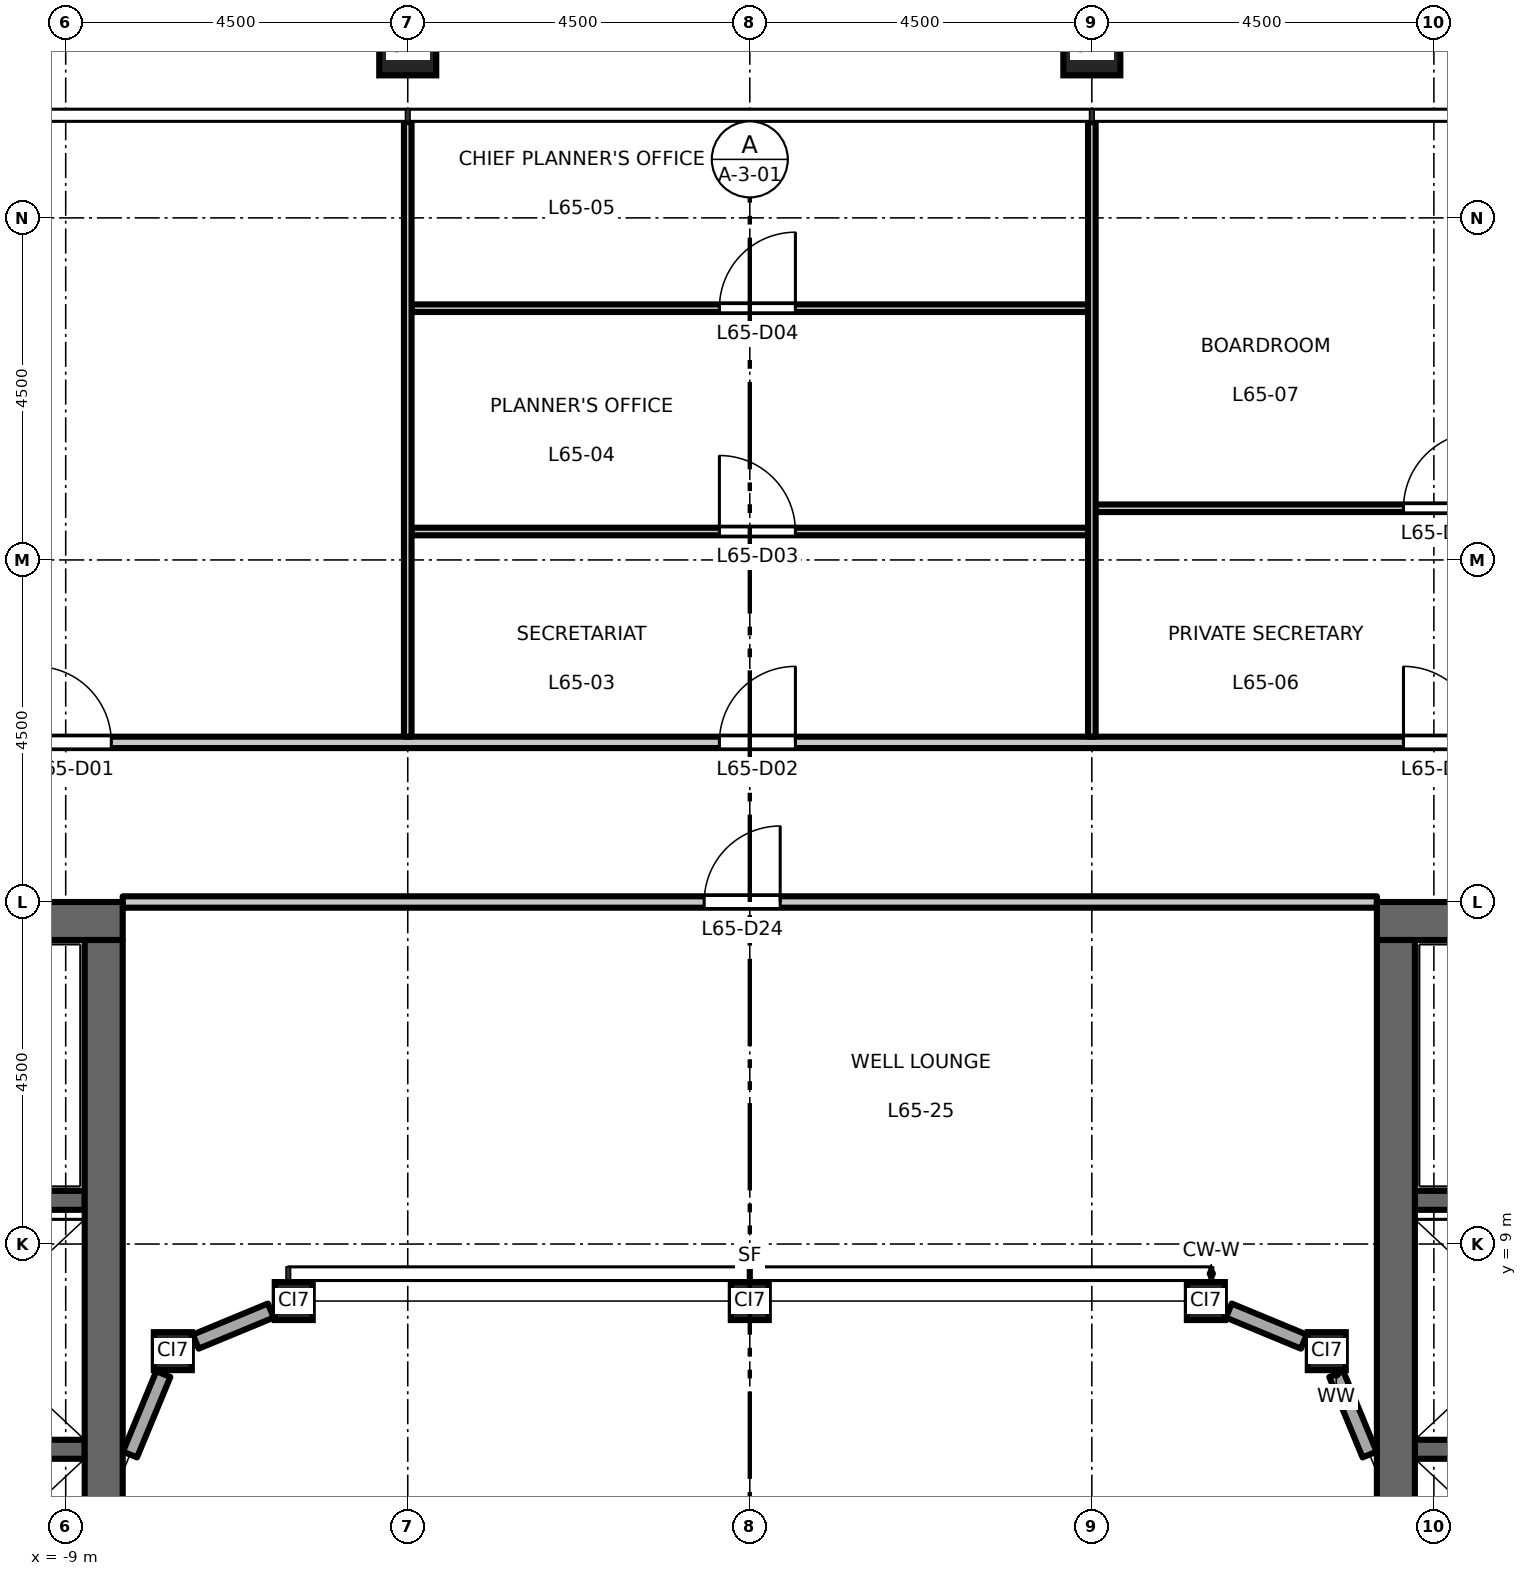
"""IFC4 building model, lengths in metres.
Left out: names, types, materials, properties, quantities, classifications, styles, units other than length and angle.
Written with IfcOpenShell. Run it as: python <this file> out.ifc"""

import sys

from ifc_helpers import new_model, si_unit, direction, frame, frame_2d, origin, origin_2d, place, context, subcontext, project, spatial, rectangle, hollow_rectangle, extrude, element, fill, save


model = new_model("IFC4")
c1 = context("Model", 3, precision=1e-05, world=origin(), true_north=direction((0.0, 1.0)))
c2 = subcontext(c1, "Body", "Model", "MODEL_VIEW")
j1 = project(units=[si_unit("LENGTHUNIT", "METRE"), si_unit("PLANEANGLEUNIT", "RADIAN")], contexts=[c1])
p1 = place(None, origin())
s1 = spatial("IfcSite", under=j1, at=p1, CompositionType="ELEMENT")
p2 = place(p1, origin())
s2 = spatial("IfcBuilding", under=s1, at=p2, CompositionType="ELEMENT")
p3 = place(p2, frame((0.0, 0.0, 303.2)))
s3 = spatial("IfcBuildingStorey", under=s2, at=p3, CompositionType="ELEMENT", Elevation=303.2)
for number, where, z_axis, x_axis in (
    (1, (4.5, 24.75, 0.0), (0.0, 0.0, 1.0), (1.0, 0.0, 0.0)),
    (2, (-4.5, 24.75, 0.0), (0.0, 0.0, 1.0), (1.0, 0.0, 0.0)),
):
    element("IfcColumn", number, at=place(p3, frame(where, z_axis=z_axis, x_axis=x_axis)), inside=s3, PredefinedType="COLUMN", context=c2, shape_type="SweptSolid", body=[
        extrude(hollow_rectangle(XDim=0.75, YDim=0.75, WallThickness=0.04, at=origin_2d()), origin(), (0.0, 0.0, 1.0), 4.5),
    ])
for number, where, z_axis, x_axis in (
    (3, (-7.591, 7.591, 0.0), (0.0, 0.0, 1.0), (1.0, 0.0, 0.0)),
    (4, (-6.0, 8.25, 0.0), (0.0, 0.0, 1.0), (1.0, 0.0, 0.0)),
    (5, (0.0, 8.25, 0.0), (0.0, 0.0, 1.0), (1.0, 0.0, 0.0)),
    (6, (6.0, 8.25, 0.0), (0.0, 0.0, 1.0), (1.0, 0.0, 0.0)),
    (7, (7.591, 7.591, 0.0), (0.0, 0.0, 1.0), (1.0, 0.0, 0.0)),
):
    element("IfcColumn", number, at=place(p3, frame(where, z_axis=z_axis, x_axis=x_axis)), inside=s3, PredefinedType="COLUMN", context=c2, shape_type="SweptSolid", body=[
        extrude(hollow_rectangle(XDim=0.5, YDim=0.5, WallThickness=0.025, at=origin_2d()), origin(), (0.0, 0.0, 1.0), 4.5),
    ])
p4 = place(p3, frame((-8.75, 6.3, 0.0), z_axis=(0.0, 0.0, 1.0), x_axis=(-1.0, 0.0, 0.0)))
e8 = element("IfcWall", 8, at=p4, inside=s3, PredefinedType="SHEAR", context=c2, shape_type="SweptSolid", body=[
    extrude(rectangle(XDim=3.1, YDim=0.25, at=frame_2d((1.55, 0.0))), origin(), (0.0, 0.0, 1.0), 4.35),
])
p5 = place(p3, frame((-8.75, 9.575, 0.0), z_axis=(0.0, 0.0, 1.0), x_axis=(-1.0, 0.0, 0.0)))
e9 = element("IfcWall", 9, at=p5, inside=s3, PredefinedType="SHEAR", context=c2, shape_type="SweptSolid", body=[
    extrude(rectangle(XDim=8.0, YDim=0.25, at=frame_2d((4.0, 0.0))), origin(), (0.0, 0.0, 1.0), 4.35),
])
p6 = place(p5, frame((6.65, 0.0, 0.0)))
e10 = element("IfcOpeningElement", 10, at=p6, cuts=e9, PredefinedType="OPENING", context=c2, shape_type="SweptSolid", body=[
    extrude(rectangle(XDim=1.1, YDim=2.1, at=frame_2d((0.55, 1.05))), frame((0.0, 0.135, 0.0), z_axis=(0.0, -1.0, 0.0), x_axis=(1.0, 0.0, 0.0)), (0.0, 0.0, 1.0), 0.27),
])
p7 = place(p3, frame((-8.25, 13.25, 0.0), z_axis=(0.0, 0.0, 1.0), x_axis=(-1.0, 0.0, 0.0)))
e11 = element("IfcWall", 11, at=p7, inside=s3, PredefinedType="SHEAR", context=c2, shape_type="SweptSolid", body=[
    extrude(rectangle(XDim=9.0, YDim=0.5, at=frame_2d((4.5, 0.0))), origin(), (0.0, 0.0, 1.0), 4.35),
])
p8 = place(p3, frame((-8.5, -13.0, 0.0), z_axis=(0.0, 0.0, 1.0), x_axis=(0.0, 1.0, 0.0)))
e12 = element("IfcWall", 12, at=p8, inside=s3, PredefinedType="SHEAR", context=c2, shape_type="SweptSolid", body=[
    extrude(rectangle(XDim=26.0, YDim=0.5, at=frame_2d((13.0, 0.0))), origin(), (0.0, 0.0, 1.0), 4.35),
])
p9 = place(p3, frame((8.75, 6.3, 0.0), z_axis=(0.0, 0.0, 1.0), x_axis=(1.0, 0.0, 0.0)))
e13 = element("IfcWall", 13, at=p9, inside=s3, PredefinedType="SHEAR", context=c2, shape_type="SweptSolid", body=[
    extrude(rectangle(XDim=3.1, YDim=0.25, at=frame_2d((1.55, 0.0))), origin(), (0.0, 0.0, 1.0), 4.35),
])
p10 = place(p3, frame((8.75, 9.575, 0.0), z_axis=(0.0, 0.0, 1.0), x_axis=(1.0, 0.0, 0.0)))
e14 = element("IfcWall", 14, at=p10, inside=s3, PredefinedType="SHEAR", context=c2, shape_type="SweptSolid", body=[
    extrude(rectangle(XDim=8.0, YDim=0.25, at=frame_2d((4.0, 0.0))), origin(), (0.0, 0.0, 1.0), 4.35),
])
p11 = place(p10, frame((6.65, 0.0, 0.0)))
e15 = element("IfcOpeningElement", 15, at=p11, cuts=e14, PredefinedType="OPENING", context=c2, shape_type="SweptSolid", body=[
    extrude(rectangle(XDim=1.1, YDim=2.1, at=frame_2d((0.55, 1.05))), frame((0.0, 0.135, 0.0), z_axis=(0.0, -1.0, 0.0), x_axis=(1.0, 0.0, 0.0)), (0.0, 0.0, 1.0), 0.27),
])
p12 = place(p3, frame((8.25, 13.25, 0.0), z_axis=(0.0, 0.0, 1.0), x_axis=(1.0, 0.0, 0.0)))
e16 = element("IfcWall", 16, at=p12, inside=s3, PredefinedType="SHEAR", context=c2, shape_type="SweptSolid", body=[
    extrude(rectangle(XDim=9.0, YDim=0.5, at=frame_2d((4.5, 0.0))), origin(), (0.0, 0.0, 1.0), 4.35),
])
p13 = place(p3, frame((8.5, -13.0, 0.0), z_axis=(0.0, 0.0, 1.0), x_axis=(0.0, 1.0, 0.0)))
e17 = element("IfcWall", 17, at=p13, inside=s3, PredefinedType="SHEAR", context=c2, shape_type="SweptSolid", body=[
    extrude(rectangle(XDim=26.0, YDim=0.5, at=frame_2d((13.0, 0.0))), origin(), (0.0, 0.0, 1.0), 4.35),
])
p14 = place(p3, frame((8.154, 6.231, 0.0), z_axis=(0.0, 0.0, 1.0), x_axis=(-0.382571404949, 0.923925927829, 0.0)))
e18 = element("IfcWall", 18, at=p14, inside=s3, PredefinedType="STANDARD", context=c2, shape_type="SweptSolid", body=[
    extrude(rectangle(XDim=1.146, YDim=0.2, at=frame_2d((0.573, 0.0))), origin(), (0.0, 0.0, 1.0), 4.01),
])
for number, where, z_axis, x_axis in (
    (19, (7.289, 7.716, 0.0), (0.0, 0.0, 1.0), (-0.924, 0.383, 0.0)),
    (20, (-6.302, 8.125, 0.0), (0.0, 0.0, 1.0), (-0.924, -0.383, 0.0)),
):
    element("IfcWall", number, at=place(p3, frame(where, z_axis=z_axis, x_axis=x_axis)), inside=s3, PredefinedType="STANDARD", context=c2, shape_type="SweptSolid", body=[
        extrude(rectangle(XDim=1.069, YDim=0.2, at=frame_2d((0.534, 0.0))), origin(), (0.0, 0.0, 1.0), 4.01),
    ])
p15 = place(p3, frame((-7.716, 7.289, 0.0), z_axis=(0.0, 0.0, 1.0), x_axis=(-0.382571404949, -0.923925927829, 0.0)))
e21 = element("IfcWall", 21, at=p15, inside=s3, PredefinedType="STANDARD", context=c2, shape_type="SweptSolid", body=[
    extrude(rectangle(XDim=1.146, YDim=0.2, at=frame_2d((0.573, 0.0))), origin(), (0.0, 0.0, 1.0), 4.01),
])
p16 = place(p3, frame((-8.25, 13.5, 0.0), z_axis=(0.0, 0.0, 1.0), x_axis=(1.0, 0.0, 0.0)))
e22 = element("IfcWall", 22, at=p16, inside=s3, PredefinedType="PARTITIONING", context=c2, shape_type="SweptSolid", body=[
    extrude(rectangle(XDim=16.5, YDim=0.15, at=frame_2d((8.25, 0.0))), origin(), (0.0, 0.0, 1.0), 4.35),
])
p17 = place(p16, frame((7.65, 0.0, 0.0)))
e23 = element("IfcOpeningElement", 23, at=p17, cuts=e22, PredefinedType="OPENING", context=c2, shape_type="SweptSolid", body=[
    extrude(rectangle(XDim=1.0, YDim=2.1, at=frame_2d((0.5, 1.05))), frame((0.0, 0.085, 0.0), z_axis=(0.0, -1.0, 0.0), x_axis=(1.0, 0.0, 0.0)), (0.0, 0.0, 1.0), 0.17),
])
p18 = place(p3, frame((-19.425, 15.6, 0.0), z_axis=(0.0, 0.0, 1.0), x_axis=(1.0, 0.0, 0.0)))
e24 = element("IfcWall", 24, at=p18, inside=s3, PredefinedType="PARTITIONING", context=c2, shape_type="SweptSolid", body=[
    extrude(rectangle(XDim=38.85, YDim=0.15, at=frame_2d((19.425, 0.0))), origin(), (0.0, 0.0, 1.0), 4.35),
])
p19 = place(p18, frame((10.025, 0.0, 0.0)))
e25 = element("IfcOpeningElement", 25, at=p19, cuts=e24, PredefinedType="OPENING", context=c2, shape_type="SweptSolid", body=[
    extrude(rectangle(XDim=1.0, YDim=2.1, at=frame_2d((0.5, 1.05))), frame((0.0, 0.085, 0.0), z_axis=(0.0, -1.0, 0.0), x_axis=(1.0, 0.0, 0.0)), (0.0, 0.0, 1.0), 0.17),
])
p20 = place(p18, frame((19.025, 0.0, 0.0)))
e26 = element("IfcOpeningElement", 26, at=p20, cuts=e24, PredefinedType="OPENING", context=c2, shape_type="SweptSolid", body=[
    extrude(rectangle(XDim=1.0, YDim=2.1, at=frame_2d((0.5, 1.05))), frame((0.0, 0.085, 0.0), z_axis=(0.0, -1.0, 0.0), x_axis=(1.0, 0.0, 0.0)), (0.0, 0.0, 1.0), 0.17),
])
p21 = place(p18, frame((28.025, 0.0, 0.0)))
e27 = element("IfcOpeningElement", 27, at=p21, cuts=e24, PredefinedType="OPENING", context=c2, shape_type="SweptSolid", body=[
    extrude(rectangle(XDim=1.0, YDim=2.1, at=frame_2d((0.5, 1.05))), frame((0.0, 0.085, 0.0), z_axis=(0.0, -1.0, 0.0), x_axis=(1.0, 0.0, 0.0)), (0.0, 0.0, 1.0), 0.17),
])
p22 = place(p3, frame((-4.45, 18.374, 0.0), z_axis=(0.0, 0.0, 1.0), x_axis=(1.0, 0.0, 0.0)))
e28 = element("IfcWall", 28, at=p22, inside=s3, PredefinedType="PARTITIONING", context=c2, shape_type="SweptSolid", body=[
    extrude(rectangle(XDim=8.9, YDim=0.1, at=frame_2d((4.45, 0.0))), origin(), (0.0, 0.0, 1.0), 4.35),
])
p23 = place(p22, frame((4.05, 0.0, 0.0)))
e29 = element("IfcOpeningElement", 29, at=p23, cuts=e28, PredefinedType="OPENING", context=c2, shape_type="SweptSolid", body=[
    extrude(rectangle(XDim=1.0, YDim=2.1, at=frame_2d((0.5, 1.05))), frame((0.0, 0.06, 0.0), z_axis=(0.0, -1.0, 0.0), x_axis=(1.0, 0.0, 0.0)), (0.0, 0.0, 1.0), 0.12),
])
p24 = place(p3, frame((4.55, 18.68, 0.0), z_axis=(0.0, 0.0, 1.0), x_axis=(1.0, 0.0, 0.0)))
e30 = element("IfcWall", 30, at=p24, inside=s3, PredefinedType="PARTITIONING", context=c2, shape_type="SweptSolid", body=[
    extrude(rectangle(XDim=8.9, YDim=0.1, at=frame_2d((4.45, 0.0))), origin(), (0.0, 0.0, 1.0), 4.35),
])
p25 = place(p24, frame((4.05, 0.0, 0.0)))
e31 = element("IfcOpeningElement", 31, at=p25, cuts=e30, PredefinedType="OPENING", context=c2, shape_type="SweptSolid", body=[
    extrude(rectangle(XDim=1.0, YDim=2.1, at=frame_2d((0.5, 1.05))), frame((0.0, 0.06, 0.0), z_axis=(0.0, -1.0, 0.0), x_axis=(1.0, 0.0, 0.0)), (0.0, 0.0, 1.0), 0.12),
])
p26 = place(p3, frame((-4.45, 21.312, 0.0), z_axis=(0.0, 0.0, 1.0), x_axis=(1.0, 0.0, 0.0)))
e32 = element("IfcWall", 32, at=p26, inside=s3, PredefinedType="PARTITIONING", context=c2, shape_type="SweptSolid", body=[
    extrude(rectangle(XDim=8.9, YDim=0.1, at=frame_2d((4.45, 0.0))), origin(), (0.0, 0.0, 1.0), 4.35),
])
p27 = place(p26, frame((4.05, 0.0, 0.0)))
e33 = element("IfcOpeningElement", 33, at=p27, cuts=e32, PredefinedType="OPENING", context=c2, shape_type="SweptSolid", body=[
    extrude(rectangle(XDim=1.0, YDim=2.1, at=frame_2d((0.5, 1.05))), frame((0.0, 0.06, 0.0), z_axis=(0.0, -1.0, 0.0), x_axis=(1.0, 0.0, 0.0)), (0.0, 0.0, 1.0), 0.12),
])
for number, where, z_axis, x_axis in (
    (34, (-4.5, 15.675, 0.0), (0.0, 0.0, 1.0), (0.0, 1.0, 0.0)),
    (35, (4.5, 15.675, 0.0), (0.0, 0.0, 1.0), (0.0, 1.0, 0.0)),
):
    element("IfcWall", number, at=place(p3, frame(where, z_axis=z_axis, x_axis=x_axis)), inside=s3, PredefinedType="PARTITIONING", context=c2, shape_type="SweptSolid", body=[
        extrude(rectangle(XDim=8.085, YDim=0.1, at=frame_2d((4.042, 0.0))), origin(), (0.0, 0.0, 1.0), 3.65),
    ])
p28 = place(p19, origin())
e36 = element("IfcDoor", 36, at=p28, inside=s3, OperationType="SINGLE_SWING_LEFT", PredefinedType="DOOR", context=c2, shape_type="SweptSolid", body=[
    extrude(rectangle(XDim=1.0, YDim=2.1, at=frame_2d((0.5, 1.05))), frame((0.0, 0.025, 0.0), z_axis=(0.0, -1.0, 0.0), x_axis=(1.0, 0.0, 0.0)), (0.0, 0.0, 1.0), 0.05),
])
fill(e25, e36)
p29 = place(p20, origin())
e37 = element("IfcDoor", 37, at=p29, inside=s3, OperationType="SINGLE_SWING_RIGHT", PredefinedType="DOOR", context=c2, shape_type="SweptSolid", body=[
    extrude(rectangle(XDim=1.0, YDim=2.1, at=frame_2d((0.5, 1.05))), frame((0.0, 0.025, 0.0), z_axis=(0.0, -1.0, 0.0), x_axis=(1.0, 0.0, 0.0)), (0.0, 0.0, 1.0), 0.05),
])
fill(e26, e37)
p30 = place(p23, origin())
e38 = element("IfcDoor", 38, at=p30, inside=s3, OperationType="SINGLE_SWING_LEFT", PredefinedType="DOOR", context=c2, shape_type="SweptSolid", body=[
    extrude(rectangle(XDim=1.0, YDim=2.1, at=frame_2d((0.5, 1.05))), frame((0.0, 0.025, 0.0), z_axis=(0.0, -1.0, 0.0), x_axis=(1.0, 0.0, 0.0)), (0.0, 0.0, 1.0), 0.05),
])
fill(e29, e38)
p31 = place(p27, origin())
e39 = element("IfcDoor", 39, at=p31, inside=s3, OperationType="SINGLE_SWING_RIGHT", PredefinedType="DOOR", context=c2, shape_type="SweptSolid", body=[
    extrude(rectangle(XDim=1.0, YDim=2.1, at=frame_2d((0.5, 1.05))), frame((0.0, 0.025, 0.0), z_axis=(0.0, -1.0, 0.0), x_axis=(1.0, 0.0, 0.0)), (0.0, 0.0, 1.0), 0.05),
])
fill(e33, e39)
p32 = place(p21, origin())
e40 = element("IfcDoor", 40, at=p32, inside=s3, OperationType="SINGLE_SWING_LEFT", PredefinedType="DOOR", context=c2, shape_type="SweptSolid", body=[
    extrude(rectangle(XDim=1.0, YDim=2.1, at=frame_2d((0.5, 1.05))), frame((0.0, 0.025, 0.0), z_axis=(0.0, -1.0, 0.0), x_axis=(1.0, 0.0, 0.0)), (0.0, 0.0, 1.0), 0.05),
])
fill(e27, e40)
p33 = place(p25, origin())
e41 = element("IfcDoor", 41, at=p33, inside=s3, OperationType="SINGLE_SWING_RIGHT", PredefinedType="DOOR", context=c2, shape_type="SweptSolid", body=[
    extrude(rectangle(XDim=1.0, YDim=2.1, at=frame_2d((0.5, 1.05))), frame((0.0, 0.025, 0.0), z_axis=(0.0, -1.0, 0.0), x_axis=(1.0, 0.0, 0.0)), (0.0, 0.0, 1.0), 0.05),
])
fill(e31, e41)
p34 = place(p17, origin())
e42 = element("IfcDoor", 42, at=p34, inside=s3, OperationType="SINGLE_SWING_RIGHT", PredefinedType="DOOR", context=c2, shape_type="SweptSolid", body=[
    extrude(rectangle(XDim=1.0, YDim=2.1, at=frame_2d((0.5, 1.05))), frame((0.0, 0.025, 0.0), z_axis=(0.0, -1.0, 0.0), x_axis=(1.0, 0.0, 0.0)), (0.0, 0.0, 1.0), 0.05),
])
fill(e23, e42)
save(model, sys.argv[1])
